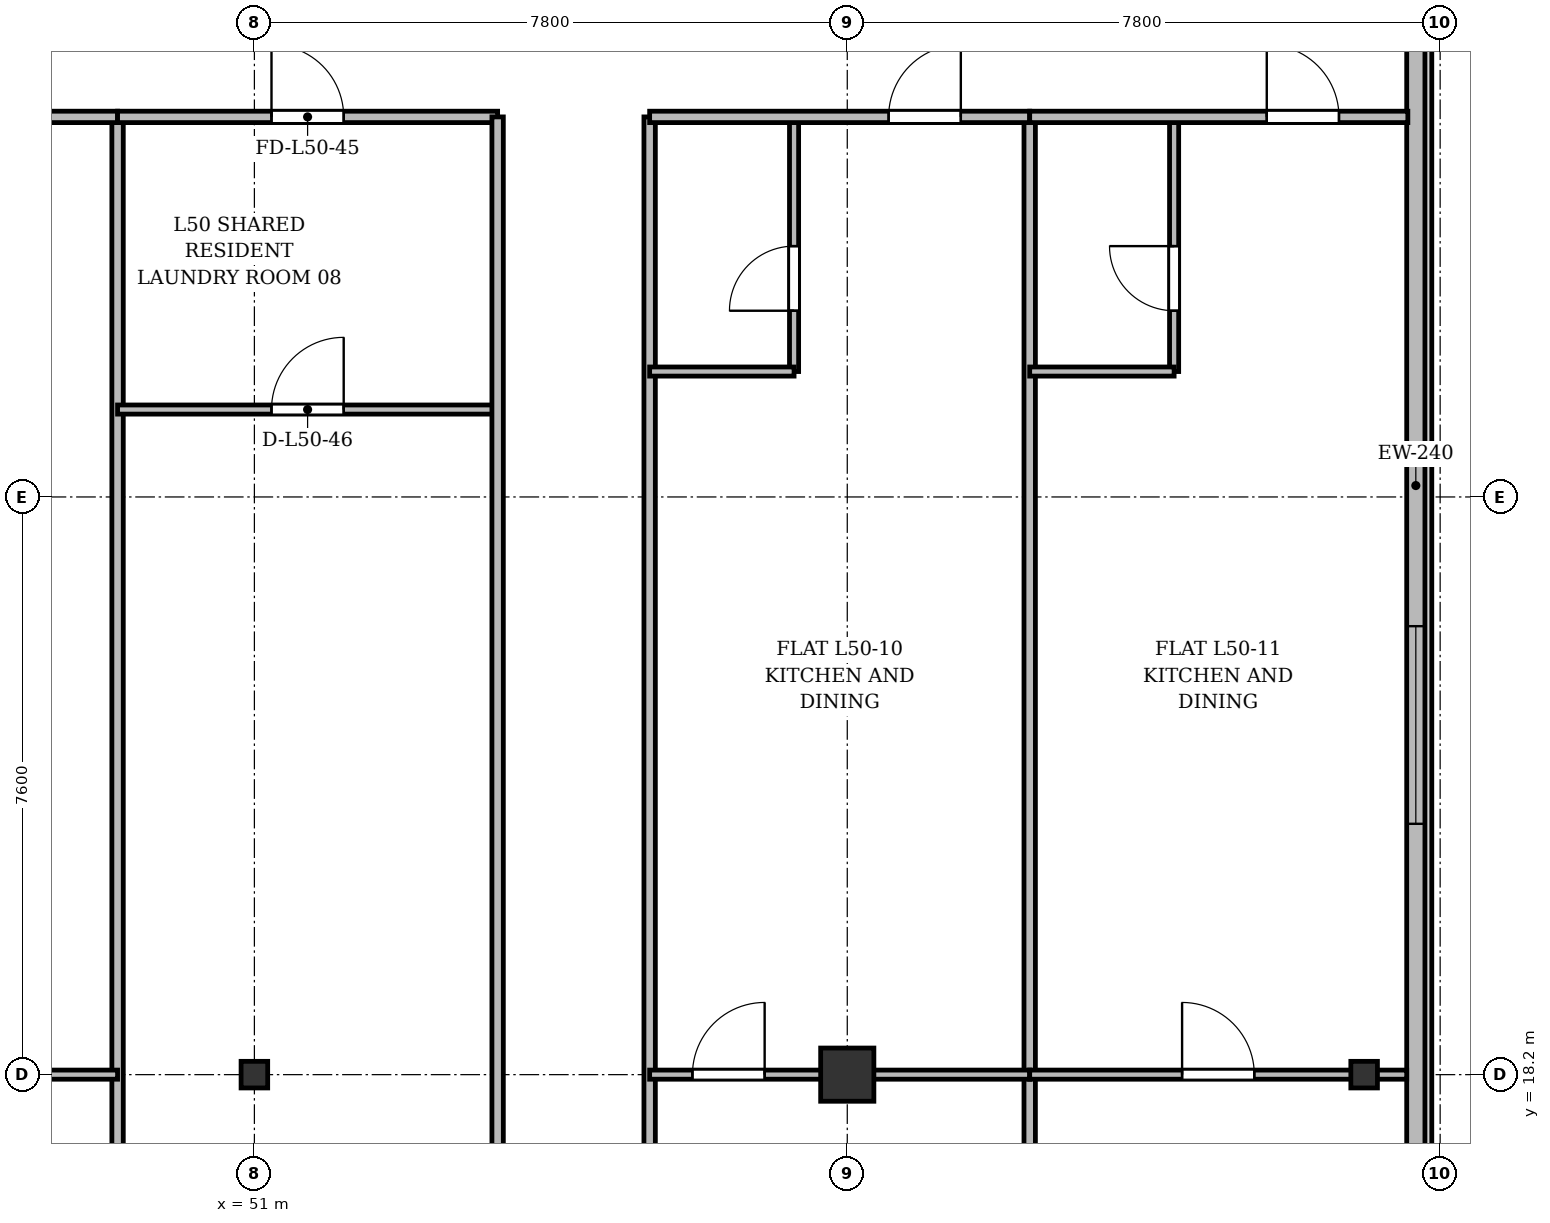
"""IFC4 building model, lengths in metres.
Left out: names, types, materials, properties, quantities, classifications, styles, units other than length and angle.
Written with IfcOpenShell. Run it as: python <this file> out.ifc"""

import sys

from ifc_helpers import new_model, si_unit, direction, frame, frame_2d, origin, origin_2d, place, context, subcontext, project, spatial, rectangle, i_section, extrude, source, transform, mapped, element, fill, save


model = new_model("IFC4")
c1 = context("Model", 3, precision=1e-05, world=origin(), true_north=direction((0.0, 1.0)))
c2 = subcontext(c1, "Body", "Model", "MODEL_VIEW")
j1 = project(units=[si_unit("LENGTHUNIT", "METRE"), si_unit("PLANEANGLEUNIT", "RADIAN")], contexts=[c1])
p1 = place(None, origin())
s1 = spatial("IfcSite", under=j1, at=p1, CompositionType="ELEMENT")
p2 = place(p1, origin())
s2 = spatial("IfcBuilding", under=s1, at=p2, CompositionType="ELEMENT")
p3 = place(p2, frame((0.0, 0.0, 194.1)))
s3 = spatial("IfcBuildingStorey", under=s2, at=p3, CompositionType="ELEMENT", Elevation=194.1)
m1 = source(origin(), c2, "Body", "SweptSolid", [
    extrude(i_section(OverallWidth=0.35, OverallDepth=0.35, WebThickness=0.018, FlangeThickness=0.028, at=origin_2d()), origin(), (0.0, 0.0, 1.0), 3.6),
])
p4 = place(p3, frame((51.0, 18.2, 0.0), z_axis=(0.0, 0.0, 1.0), x_axis=(1.0, 0.0, 0.0)))
e1 = element("IfcColumn", 1, at=p4, inside=s3, PredefinedType="COLUMN", context=c2, shape_type="MappedRepresentation", body=[
    mapped(m1, transform((0.0, 0.0, 0.0), x_axis=(1.0, 0.0, 0.0), y_axis=(0.0, 1.0, 0.0), z_axis=(0.0, 0.0, 1.0), scale=1.0)),
])
m2 = source(origin(), c2, "Body", "SweptSolid", [
    extrude(rectangle(XDim=0.7, YDim=0.7, at=origin_2d()), origin(), (0.0, 0.0, 1.0), 3.6),
])
p5 = place(p3, frame((58.8, 18.2, 0.0), z_axis=(0.0, 0.0, 1.0), x_axis=(1.0, 0.0, 0.0)))
e2 = element("IfcColumn", 2, at=p5, inside=s3, PredefinedType="COLUMN", context=c2, shape_type="MappedRepresentation", body=[
    mapped(m2, transform((0.0, 0.0, 0.0), x_axis=(1.0, 0.0, 0.0), y_axis=(0.0, 1.0, 0.0), z_axis=(0.0, 0.0, 1.0), scale=1.0)),
])
p6 = place(p3, frame((65.6, 18.2, 0.0), z_axis=(0.0, 0.0, 1.0), x_axis=(1.0, 0.0, 0.0)))
e3 = element("IfcColumn", 3, at=p6, inside=s3, PredefinedType="COLUMN", context=c2, shape_type="MappedRepresentation", body=[
    mapped(m1, transform((0.0, 0.0, 0.0), x_axis=(1.0, 0.0, 0.0), y_axis=(0.0, 1.0, 0.0), z_axis=(0.0, 0.0, 1.0), scale=1.0)),
])
p7 = place(p3, frame((66.28, 45.5, 0.0), z_axis=(0.0, 0.0, 1.0), x_axis=(0.0, -1.0, 0.0)))
e4 = element("IfcWall", 4, at=p7, inside=s3, PredefinedType="SOLIDWALL", context=c2, shape_type="SweptSolid", body=[
    extrude(rectangle(XDim=39.1, YDim=0.24, at=frame_2d((19.55, 0.0))), origin(), (0.0, 0.0, 1.0), 3.36),
])
p8 = place(p7, frame((36.45, 0.0, 0.92)))
e5 = element("IfcOpeningElement", 5, at=p8, cuts=e4, PredefinedType="OPENING", context=c2, shape_type="SweptSolid", body=[
    extrude(rectangle(XDim=1.2, YDim=1.65, at=frame_2d((0.6, 0.825))), frame((0.0, 0.13, 0.0), z_axis=(0.0, -1.0, 0.0), x_axis=(1.0, 0.0, 0.0)), (0.0, 0.0, 1.0), 0.26),
])
p9 = place(p7, frame((32.8, 0.0, 0.92)))
e6 = element("IfcOpeningElement", 6, at=p9, cuts=e4, PredefinedType="OPENING", context=c2, shape_type="SweptSolid", body=[
    extrude(rectangle(XDim=2.6, YDim=1.9, at=frame_2d((1.3, 0.95))), frame((0.0, 0.13, 0.0), z_axis=(0.0, -1.0, 0.0), x_axis=(1.0, 0.0, 0.0)), (0.0, 0.0, 1.0), 0.26),
])
p10 = place(p7, frame((28.6, 0.0, 0.92)))
e7 = element("IfcOpeningElement", 7, at=p10, cuts=e4, PredefinedType="OPENING", context=c2, shape_type="SweptSolid", body=[
    extrude(rectangle(XDim=2.6, YDim=1.9, at=frame_2d((1.3, 0.95))), frame((0.0, 0.13, 0.0), z_axis=(0.0, -1.0, 0.0), x_axis=(1.0, 0.0, 0.0)), (0.0, 0.0, 1.0), 0.26),
])
p11 = place(p7, frame((21.4, 0.0, 0.92)))
e8 = element("IfcOpeningElement", 8, at=p11, cuts=e4, PredefinedType="OPENING", context=c2, shape_type="SweptSolid", body=[
    extrude(rectangle(XDim=2.6, YDim=1.9, at=frame_2d((1.3, 0.95))), frame((0.0, 0.13, 0.0), z_axis=(0.0, -1.0, 0.0), x_axis=(1.0, 0.0, 0.0)), (0.0, 0.0, 1.0), 0.26),
])
p12 = place(p7, frame((7.4, 0.0, 0.92)))
e9 = element("IfcOpeningElement", 9, at=p12, cuts=e4, PredefinedType="OPENING", context=c2, shape_type="SweptSolid", body=[
    extrude(rectangle(XDim=2.6, YDim=1.9, at=frame_2d((1.3, 0.95))), frame((0.0, 0.13, 0.0), z_axis=(0.0, -1.0, 0.0), x_axis=(1.0, 0.0, 0.0)), (0.0, 0.0, 1.0), 0.26),
])
p13 = place(p7, frame((4.5, 0.0, 0.92)))
e10 = element("IfcOpeningElement", 10, at=p13, cuts=e4, PredefinedType="OPENING", context=c2, shape_type="SweptSolid", body=[
    extrude(rectangle(XDim=1.2, YDim=1.65, at=frame_2d((0.6, 0.825))), frame((0.0, 0.13, 0.0), z_axis=(0.0, -1.0, 0.0), x_axis=(1.0, 0.0, 0.0)), (0.0, 0.0, 1.0), 0.26),
])
p14 = place(p7, frame((1.15, 0.0, 0.92)))
e11 = element("IfcOpeningElement", 11, at=p14, cuts=e4, PredefinedType="OPENING", context=c2, shape_type="SweptSolid", body=[
    extrude(rectangle(XDim=1.2, YDim=1.65, at=frame_2d((0.6, 0.825))), frame((0.0, 0.13, 0.0), z_axis=(0.0, -1.0, 0.0), x_axis=(1.0, 0.0, 0.0)), (0.0, 0.0, 1.0), 0.26),
])
for number, where, z_axis, x_axis in (
    (12, (49.2, 3.625, 0.0), (0.0, 0.0, 1.0), (0.0, 1.0, 0.0)),
    (13, (61.2, 3.625, 0.0), (0.0, 0.0, 1.0), (0.0, 1.0, 0.0)),
):
    element("IfcWall", number, at=place(p3, frame(where, z_axis=z_axis, x_axis=x_axis)), inside=s3, PredefinedType="PARTITIONING", context=c2, shape_type="SweptSolid", body=[
        extrude(rectangle(XDim=27.175, YDim=0.15, at=frame_2d((13.587, 0.0))), origin(), (0.0, 0.0, 1.0), 2.91),
    ])
p15 = place(p3, frame((44.0, 30.8, 0.0), z_axis=(0.0, 0.0, 1.0), x_axis=(1.0, 0.0, 0.0)))
e14 = element("IfcWall", 14, at=p15, inside=s3, PredefinedType="PARTITIONING", context=c2, shape_type="SweptSolid", body=[
    extrude(rectangle(XDim=5.2, YDim=0.15, at=frame_2d((2.6, 0.0))), origin(), (0.0, 0.0, 1.0), 3.36),
])
p16 = place(p15, frame((2.033, 0.0, 0.0)))
e15 = element("IfcOpeningElement", 15, at=p16, cuts=e14, PredefinedType="OPENING", context=c2, shape_type="SweptSolid", body=[
    extrude(rectangle(XDim=0.95, YDim=2.15, at=frame_2d((0.475, 1.075))), frame((0.0, 0.085, 0.0), z_axis=(0.0, -1.0, 0.0), x_axis=(1.0, 0.0, 0.0)), (0.0, 0.0, 1.0), 0.17),
])
p17 = place(p3, frame((44.025, 18.2, 0.0), z_axis=(0.0, 0.0, 1.0), x_axis=(1.0, 0.0, 0.0)))
e16 = element("IfcWall", 16, at=p17, inside=s3, PredefinedType="PARTITIONING", context=c2, shape_type="SweptSolid", body=[
    extrude(rectangle(XDim=5.175, YDim=0.12, at=frame_2d((2.587, 0.0))), origin(), (0.0, 0.0, 1.0), 2.91),
])
p18 = place(p17, frame((2.021, 0.0, 0.0)))
e17 = element("IfcOpeningElement", 17, at=p18, cuts=e16, PredefinedType="OPENING", context=c2, shape_type="SweptSolid", body=[
    extrude(rectangle(XDim=0.95, YDim=2.15, at=frame_2d((0.475, 1.075))), frame((0.0, 0.07, 0.0), z_axis=(0.0, -1.0, 0.0), x_axis=(1.0, 0.0, 0.0)), (0.0, 0.0, 1.0), 0.14),
])
p19 = place(p3, frame((49.2, 30.8, 0.0), z_axis=(0.0, 0.0, 1.0), x_axis=(1.0, 0.0, 0.0)))
e18 = element("IfcWall", 18, at=p19, inside=s3, PredefinedType="PARTITIONING", context=c2, shape_type="SweptSolid", body=[
    extrude(rectangle(XDim=5.0, YDim=0.15, at=frame_2d((2.5, 0.0))), origin(), (0.0, 0.0, 1.0), 2.86),
])
p20 = place(p19, frame((2.025, 0.0, 0.0)))
e19 = element("IfcOpeningElement", 19, at=p20, cuts=e18, PredefinedType="OPENING", context=c2, shape_type="SweptSolid", body=[
    extrude(rectangle(XDim=0.95, YDim=2.15, at=frame_2d((0.475, 1.075))), frame((0.0, 0.085, 0.0), z_axis=(0.0, -1.0, 0.0), x_axis=(1.0, 0.0, 0.0)), (0.0, 0.0, 1.0), 0.17),
])
p21 = place(p3, frame((49.2, 26.95, 0.0), z_axis=(0.0, 0.0, 1.0), x_axis=(1.0, 0.0, 0.0)))
e20 = element("IfcWall", 20, at=p21, inside=s3, PredefinedType="PARTITIONING", context=c2, shape_type="SweptSolid", body=[
    extrude(rectangle(XDim=5.0, YDim=0.12, at=frame_2d((2.5, 0.0))), origin(), (0.0, 0.0, 1.0), 2.86),
])
p22 = place(p21, frame((2.025, 0.0, 0.0)))
e21 = element("IfcOpeningElement", 21, at=p22, cuts=e20, PredefinedType="OPENING", context=c2, shape_type="SweptSolid", body=[
    extrude(rectangle(XDim=0.95, YDim=2.15, at=frame_2d((0.475, 1.075))), frame((0.0, 0.07, 0.0), z_axis=(0.0, -1.0, 0.0), x_axis=(1.0, 0.0, 0.0)), (0.0, 0.0, 1.0), 0.14),
])
for number, where, z_axis, x_axis in (
    (22, (54.2, 3.625, 0.0), (0.0, 0.0, 1.0), (0.0, 1.0, 0.0)),
    (23, (56.2, 3.625, 0.0), (0.0, 0.0, 1.0), (0.0, 1.0, 0.0)),
):
    element("IfcWall", number, at=place(p3, frame(where, z_axis=z_axis, x_axis=x_axis)), inside=s3, PredefinedType="PARTITIONING", context=c2, shape_type="SweptSolid", body=[
        extrude(rectangle(XDim=27.175, YDim=0.15, at=frame_2d((13.587, 0.0))), origin(), (0.0, 0.0, 1.0), 2.91),
    ])
p23 = place(p3, frame((56.2, 18.2, 0.0), z_axis=(0.0, 0.0, 1.0), x_axis=(1.0, 0.0, 0.0)))
e24 = element("IfcWall", 24, at=p23, inside=s3, PredefinedType="PARTITIONING", context=c2, shape_type="SweptSolid", body=[
    extrude(rectangle(XDim=5.0, YDim=0.12, at=frame_2d((2.5, 0.0))), origin(), (0.0, 0.0, 1.0), 2.91),
])
p24 = place(p23, frame((0.563, 0.0, 0.0)))
e25 = element("IfcOpeningElement", 25, at=p24, cuts=e24, PredefinedType="OPENING", context=c2, shape_type="SweptSolid", body=[
    extrude(rectangle(XDim=0.95, YDim=2.15, at=frame_2d((0.475, 1.075))), frame((0.0, 0.07, 0.0), z_axis=(0.0, -1.0, 0.0), x_axis=(1.0, 0.0, 0.0)), (0.0, 0.0, 1.0), 0.14),
])
p25 = place(p3, frame((58.1, 27.45, 0.0), z_axis=(0.0, 0.0, 1.0), x_axis=(0.0, 1.0, 0.0)))
e26 = element("IfcWall", 26, at=p25, inside=s3, PredefinedType="PARTITIONING", context=c2, shape_type="SweptSolid", body=[
    extrude(rectangle(XDim=3.35, YDim=0.12, at=frame_2d((1.675, 0.0))), origin(), (0.0, 0.0, 1.0), 3.36),
])
p26 = place(p25, frame((0.8, 0.0, 0.0)))
e27 = element("IfcOpeningElement", 27, at=p26, cuts=e26, PredefinedType="OPENING", context=c2, shape_type="SweptSolid", body=[
    extrude(rectangle(XDim=0.85, YDim=2.1, at=frame_2d((0.425, 1.05))), frame((0.0, 0.07, 0.0), z_axis=(0.0, -1.0, 0.0), x_axis=(1.0, 0.0, 0.0)), (0.0, 0.0, 1.0), 0.14),
])
p27 = place(p3, frame((56.2, 27.45, 0.0), z_axis=(0.0, 0.0, 1.0), x_axis=(1.0, 0.0, 0.0)))
e28 = element("IfcWall", 28, at=p27, inside=s3, PredefinedType="PARTITIONING", context=c2, shape_type="SweptSolid", body=[
    extrude(rectangle(XDim=1.9, YDim=0.12, at=frame_2d((0.95, 0.0))), origin(), (0.0, 0.0, 1.0), 3.36),
])
p28 = place(p3, frame((56.2, 30.8, 0.0), z_axis=(0.0, 0.0, 1.0), x_axis=(1.0, 0.0, 0.0)))
e29 = element("IfcWall", 29, at=p28, inside=s3, PredefinedType="PARTITIONING", context=c2, shape_type="SweptSolid", body=[
    extrude(rectangle(XDim=5.0, YDim=0.15, at=frame_2d((2.5, 0.0))), origin(), (0.0, 0.0, 1.0), 2.86),
])
p29 = place(p28, frame((3.144, 0.0, 0.0)))
e30 = element("IfcOpeningElement", 30, at=p29, cuts=e29, PredefinedType="OPENING", context=c2, shape_type="SweptSolid", body=[
    extrude(rectangle(XDim=0.95, YDim=2.15, at=frame_2d((0.475, 1.075))), frame((0.0, 0.085, 0.0), z_axis=(0.0, -1.0, 0.0), x_axis=(1.0, 0.0, 0.0)), (0.0, 0.0, 1.0), 0.17),
])
p30 = place(p3, frame((61.2, 18.2, 0.0), z_axis=(0.0, 0.0, 1.0), x_axis=(1.0, 0.0, 0.0)))
e31 = element("IfcWall", 31, at=p30, inside=s3, PredefinedType="PARTITIONING", context=c2, shape_type="SweptSolid", body=[
    extrude(rectangle(XDim=4.96, YDim=0.12, at=frame_2d((2.48, 0.0))), origin(), (0.0, 0.0, 1.0), 2.91),
])
p31 = place(p30, frame((2.005, 0.0, 0.0)))
e32 = element("IfcOpeningElement", 32, at=p31, cuts=e31, PredefinedType="OPENING", context=c2, shape_type="SweptSolid", body=[
    extrude(rectangle(XDim=0.95, YDim=2.15, at=frame_2d((0.475, 1.075))), frame((0.0, 0.07, 0.0), z_axis=(0.0, -1.0, 0.0), x_axis=(1.0, 0.0, 0.0)), (0.0, 0.0, 1.0), 0.14),
])
p32 = place(p3, frame((63.1, 27.45, 0.0), z_axis=(0.0, 0.0, 1.0), x_axis=(0.0, 1.0, 0.0)))
e33 = element("IfcWall", 33, at=p32, inside=s3, PredefinedType="PARTITIONING", context=c2, shape_type="SweptSolid", body=[
    extrude(rectangle(XDim=3.35, YDim=0.12, at=frame_2d((1.675, 0.0))), origin(), (0.0, 0.0, 1.0), 3.36),
])
p33 = place(p32, frame((0.8, 0.0, 0.0)))
e34 = element("IfcOpeningElement", 34, at=p33, cuts=e33, PredefinedType="OPENING", context=c2, shape_type="SweptSolid", body=[
    extrude(rectangle(XDim=0.85, YDim=2.1, at=frame_2d((0.425, 1.05))), frame((0.0, 0.07, 0.0), z_axis=(0.0, -1.0, 0.0), x_axis=(1.0, 0.0, 0.0)), (0.0, 0.0, 1.0), 0.14),
])
p34 = place(p3, frame((61.2, 27.45, 0.0), z_axis=(0.0, 0.0, 1.0), x_axis=(1.0, 0.0, 0.0)))
e35 = element("IfcWall", 35, at=p34, inside=s3, PredefinedType="PARTITIONING", context=c2, shape_type="SweptSolid", body=[
    extrude(rectangle(XDim=1.9, YDim=0.12, at=frame_2d((0.95, 0.0))), origin(), (0.0, 0.0, 1.0), 3.36),
])
p35 = place(p3, frame((61.2, 30.8, 0.0), z_axis=(0.0, 0.0, 1.0), x_axis=(1.0, 0.0, 0.0)))
e36 = element("IfcWall", 36, at=p35, inside=s3, PredefinedType="PARTITIONING", context=c2, shape_type="SweptSolid", body=[
    extrude(rectangle(XDim=4.975, YDim=0.15, at=frame_2d((2.488, 0.0))), origin(), (0.0, 0.0, 1.0), 2.86),
])
p36 = place(p35, frame((3.119, 0.0, 0.0)))
e37 = element("IfcOpeningElement", 37, at=p36, cuts=e36, PredefinedType="OPENING", context=c2, shape_type="SweptSolid", body=[
    extrude(rectangle(XDim=0.95, YDim=2.15, at=frame_2d((0.475, 1.075))), frame((0.0, 0.085, 0.0), z_axis=(0.0, -1.0, 0.0), x_axis=(1.0, 0.0, 0.0)), (0.0, 0.0, 1.0), 0.17),
])
m3 = source(origin(), c2, "Body", "SweptSolid", [
    extrude(rectangle(XDim=2.6, YDim=1.9, at=frame_2d((1.3, 0.95))), frame((0.0, 0.03, 0.0), z_axis=(0.0, -1.0, 0.0), x_axis=(1.0, 0.0, 0.0)), (0.0, 0.0, 1.0), 0.06),
])
p37 = place(p11, origin())
e38 = element("IfcWindow", 38, at=p37, inside=s3, PartitioningType="SINGLE_PANEL", PredefinedType="WINDOW", context=c2, shape_type="MappedRepresentation", body=[
    mapped(m3, transform((0.0, 0.0, 0.0), x_axis=(1.0, 0.0, 0.0), y_axis=(0.0, 1.0, 0.0), z_axis=(0.0, 0.0, 1.0), scale=1.0)),
])
fill(e8, e38)
m4 = source(origin(), c2, "Body", "SweptSolid", [
    extrude(rectangle(XDim=0.95, YDim=2.15, at=frame_2d((0.475, 1.075))), frame((0.0, 0.025, 0.0), z_axis=(0.0, -1.0, 0.0), x_axis=(1.0, 0.0, 0.0)), (0.0, 0.0, 1.0), 0.05),
])
p38 = place(p20, origin())
e39 = element("IfcDoor", 39, at=p38, inside=s3, OperationType="SINGLE_SWING_LEFT", PredefinedType="DOOR", context=c2, shape_type="MappedRepresentation", body=[
    mapped(m4, transform((0.0, 0.0, 0.0), x_axis=(1.0, 0.0, 0.0), y_axis=(0.0, 1.0, 0.0), z_axis=(0.0, 0.0, 1.0), scale=1.0)),
])
fill(e19, e39)
p39 = place(p22, origin())
e40 = element("IfcDoor", 40, at=p39, inside=s3, OperationType="SINGLE_SWING_RIGHT", PredefinedType="DOOR", context=c2, shape_type="MappedRepresentation", body=[
    mapped(m4, transform((0.0, 0.0, 0.0), x_axis=(1.0, 0.0, 0.0), y_axis=(0.0, 1.0, 0.0), z_axis=(0.0, 0.0, 1.0), scale=1.0)),
])
fill(e21, e40)
p40 = place(p24, origin())
e41 = element("IfcDoor", 41, at=p40, inside=s3, OperationType="SINGLE_SWING_RIGHT", PredefinedType="DOOR", context=c2, shape_type="MappedRepresentation", body=[
    mapped(m4, transform((0.0, 0.0, 0.0), x_axis=(1.0, 0.0, 0.0), y_axis=(0.0, 1.0, 0.0), z_axis=(0.0, 0.0, 1.0), scale=1.0)),
])
fill(e25, e41)
m5 = source(origin(), c2, "Body", "SweptSolid", [
    extrude(rectangle(XDim=0.85, YDim=2.1, at=frame_2d((0.425, 1.05))), frame((0.0, 0.025, 0.0), z_axis=(0.0, -1.0, 0.0), x_axis=(1.0, 0.0, 0.0)), (0.0, 0.0, 1.0), 0.05),
])
p41 = place(p26, origin())
e42 = element("IfcDoor", 42, at=p41, inside=s3, OperationType="SINGLE_SWING_LEFT", PredefinedType="DOOR", context=c2, shape_type="MappedRepresentation", body=[
    mapped(m5, transform((0.0, 0.0, 0.0), x_axis=(1.0, 0.0, 0.0), y_axis=(0.0, 1.0, 0.0), z_axis=(0.0, 0.0, 1.0), scale=1.0)),
])
fill(e27, e42)
p42 = place(p29, origin())
e43 = element("IfcDoor", 43, at=p42, inside=s3, OperationType="SINGLE_SWING_RIGHT", PredefinedType="DOOR", context=c2, shape_type="MappedRepresentation", body=[
    mapped(m4, transform((0.0, 0.0, 0.0), x_axis=(1.0, 0.0, 0.0), y_axis=(0.0, 1.0, 0.0), z_axis=(0.0, 0.0, 1.0), scale=1.0)),
])
fill(e30, e43)
p43 = place(p31, origin())
e44 = element("IfcDoor", 44, at=p43, inside=s3, OperationType="SINGLE_SWING_LEFT", PredefinedType="DOOR", context=c2, shape_type="MappedRepresentation", body=[
    mapped(m4, transform((0.0, 0.0, 0.0), x_axis=(1.0, 0.0, 0.0), y_axis=(0.0, 1.0, 0.0), z_axis=(0.0, 0.0, 1.0), scale=1.0)),
])
fill(e32, e44)
p44 = place(p33, origin())
e45 = element("IfcDoor", 45, at=p44, inside=s3, OperationType="SINGLE_SWING_RIGHT", PredefinedType="DOOR", context=c2, shape_type="MappedRepresentation", body=[
    mapped(m5, transform((0.0, 0.0, 0.0), x_axis=(1.0, 0.0, 0.0), y_axis=(0.0, 1.0, 0.0), z_axis=(0.0, 0.0, 1.0), scale=1.0)),
])
fill(e34, e45)
p45 = place(p36, origin())
e46 = element("IfcDoor", 46, at=p45, inside=s3, OperationType="SINGLE_SWING_LEFT", PredefinedType="DOOR", context=c2, shape_type="MappedRepresentation", body=[
    mapped(m4, transform((0.0, 0.0, 0.0), x_axis=(1.0, 0.0, 0.0), y_axis=(0.0, 1.0, 0.0), z_axis=(0.0, 0.0, 1.0), scale=1.0)),
])
fill(e37, e46)
save(model, sys.argv[1])
